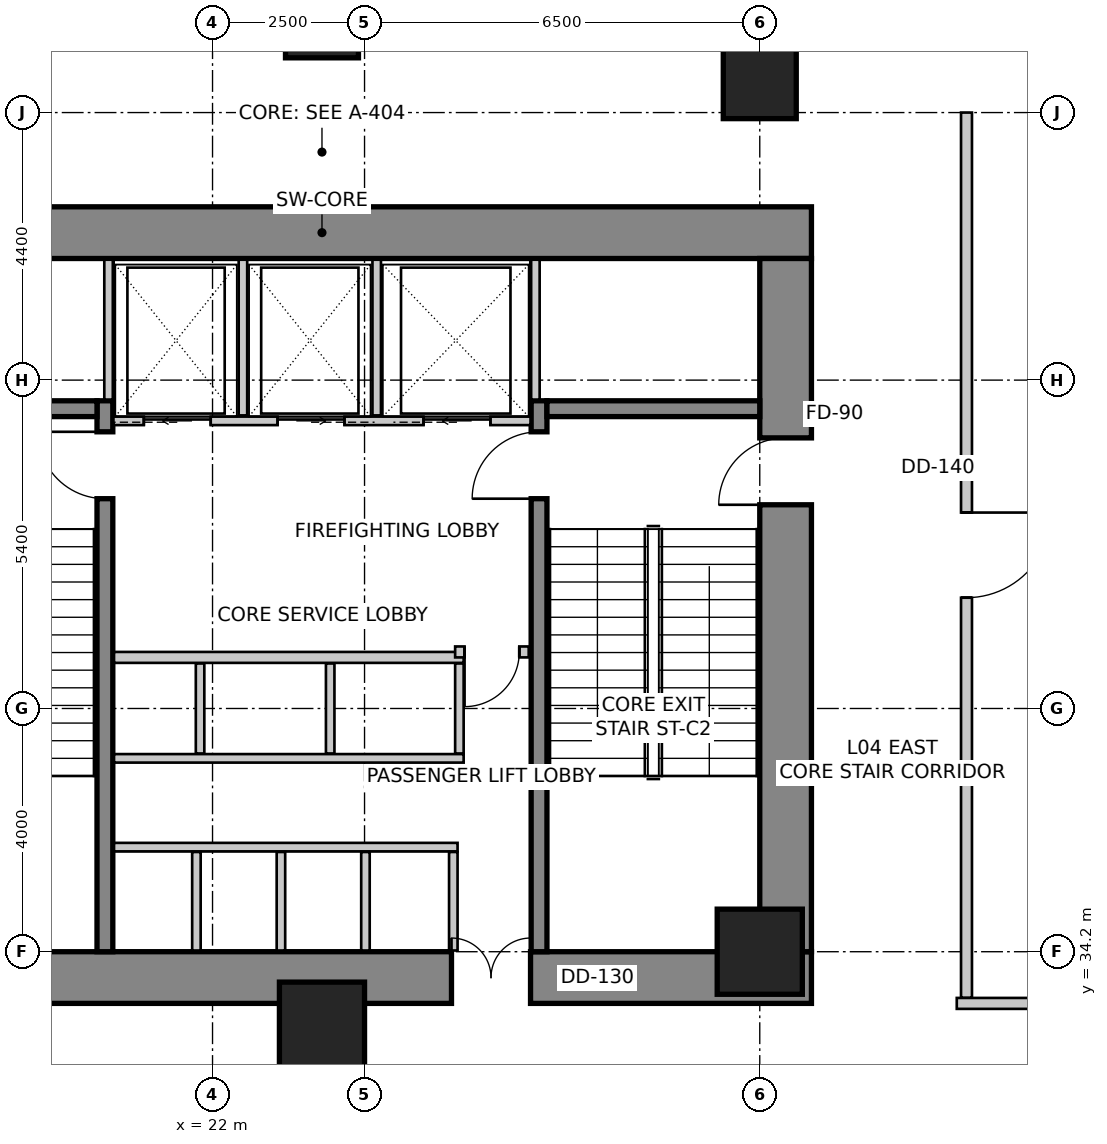
"""IFC4 building model, lengths in metres.
Left out: names, types, materials, properties, quantities, classifications, styles, units other than length and angle.
Written with IfcOpenShell. Run it as: python <this file> out.ifc"""

import sys

from ifc_helpers import new_model, si_unit, direction, frame, frame_2d, origin, origin_2d, place, context, subcontext, project, spatial, rectangle, extrude, source, transform, mapped, element, fill, save


model = new_model("IFC4")
c1 = context("Model", 3, precision=1e-05, world=origin(), true_north=direction((0.0, 1.0)))
c2 = subcontext(c1, "Body", "Model", "MODEL_VIEW")
j1 = project(units=[si_unit("LENGTHUNIT", "METRE"), si_unit("PLANEANGLEUNIT", "RADIAN")], contexts=[c1])
p1 = place(None, origin())
s1 = spatial("IfcSite", under=j1, at=p1, CompositionType="ELEMENT")
p2 = place(p1, origin())
s2 = spatial("IfcBuilding", under=s1, at=p2, CompositionType="ELEMENT")
p3 = place(p2, frame((0.0, 0.0, 16.4)))
s3 = spatial("IfcBuildingStorey", under=s2, at=p3, CompositionType="ELEMENT", Elevation=16.4)
p4 = place(p3, frame((15.75, 46.025, 0.0), z_axis=(0.0, 0.0, 1.0), x_axis=(1.0, 0.0, 0.0)))
e1 = element("IfcWall", 1, at=p4, inside=s3, PredefinedType="SHEAR", context=c2, shape_type="SweptSolid", body=[
    extrude(rectangle(XDim=16.1, YDim=0.85, at=frame_2d((8.05, 0.0))), origin(), (0.0, 0.0, 1.0), 5.2),
])
p5 = place(p3, frame((15.75, 33.775, 0.0), z_axis=(0.0, 0.0, 1.0), x_axis=(1.0, 0.0, 0.0)))
e2 = element("IfcWall", 2, at=p5, inside=s3, PredefinedType="SHEAR", context=c2, shape_type="SweptSolid", body=[
    extrude(rectangle(XDim=16.1, YDim=0.85, at=frame_2d((8.05, 0.0))), origin(), (0.0, 0.0, 1.0), 5.2),
])
m1 = source(origin(), c2, "Body", "SweptSolid", [
    extrude(rectangle(XDim=1.3, YDim=2.15, at=frame_2d((0.65, 1.075))), frame((0.0, 0.435, 0.0), z_axis=(0.0, -1.0, 0.0), x_axis=(1.0, 0.0, 0.0)), (0.0, 0.0, 1.0), 0.87),
])
p6 = place(p5, frame((10.18, 0.0, 0.0)))
e3 = element("IfcOpeningElement", 3, at=p6, cuts=e2, PredefinedType="OPENING", context=c2, shape_type="MappedRepresentation", body=[
    mapped(m1, transform((0.0, 0.0, 0.0), scale=1.0)),
])
p7 = place(p3, frame((31.425, 34.2, 0.0), z_axis=(0.0, 0.0, 1.0), x_axis=(0.0, 1.0, 0.0)))
e4 = element("IfcWall", 4, at=p7, inside=s3, PredefinedType="SHEAR", context=c2, shape_type="SweptSolid", body=[
    extrude(rectangle(XDim=11.4, YDim=0.85, at=frame_2d((5.7, 0.0))), origin(), (0.0, 0.0, 1.0), 5.2),
])
m2 = source(origin(), c2, "Body", "SweptSolid", [
    extrude(rectangle(XDim=1.1, YDim=2.15, at=frame_2d((0.55, 1.075))), frame((0.0, 0.435, 0.0), z_axis=(0.0, -1.0, 0.0), x_axis=(1.0, 0.0, 0.0)), (0.0, 0.0, 1.0), 0.87),
])
p8 = place(p7, frame((7.35, 0.0, 0.0)))
e5 = element("IfcOpeningElement", 5, at=p8, cuts=e4, PredefinedType="OPENING", context=c2, shape_type="MappedRepresentation", body=[
    mapped(m2, transform((0.0, 0.0, 0.0), scale=1.0)),
])
p9 = place(p3, frame((20.23, 34.2, 0.0), z_axis=(0.0, 0.0, 1.0), x_axis=(0.0, 1.0, 0.0)))
e6 = element("IfcWall", 6, at=p9, inside=s3, PredefinedType="SHEAR", context=c2, shape_type="SweptSolid", body=[
    extrude(rectangle(XDim=9.06, YDim=0.26, at=frame_2d((4.53, 0.0))), origin(), (0.0, 0.0, 1.0), 5.2),
])
m3 = source(origin(), c2, "Body", "SweptSolid", [
    extrude(rectangle(XDim=1.1, YDim=2.15, at=frame_2d((0.55, 1.075))), frame((0.0, 0.14, 0.0), z_axis=(0.0, -1.0, 0.0), x_axis=(1.0, 0.0, 0.0)), (0.0, 0.0, 1.0), 0.28),
])
p10 = place(p9, frame((7.45, 0.0, 0.0)))
e7 = element("IfcOpeningElement", 7, at=p10, cuts=e6, PredefinedType="OPENING", context=c2, shape_type="MappedRepresentation", body=[
    mapped(m3, transform((0.0, 0.0, 0.0), scale=1.0)),
])
p11 = place(p3, frame((27.37, 34.2, 0.0), z_axis=(0.0, 0.0, 1.0), x_axis=(0.0, 1.0, 0.0)))
e8 = element("IfcWall", 8, at=p11, inside=s3, PredefinedType="SHEAR", context=c2, shape_type="SweptSolid", body=[
    extrude(rectangle(XDim=9.06, YDim=0.26, at=frame_2d((4.53, 0.0))), origin(), (0.0, 0.0, 1.0), 5.2),
])
p12 = place(p11, frame((7.45, 0.0, 0.0)))
e9 = element("IfcOpeningElement", 9, at=p12, cuts=e8, PredefinedType="OPENING", context=c2, shape_type="MappedRepresentation", body=[
    mapped(m3, transform((0.0, 0.0, 0.0), scale=1.0)),
])
for number, where, z_axis, x_axis in (
    (10, (16.6, 43.13, 0.0), (0.0, 0.0, 1.0), (1.0, 0.0, 0.0)),
    (11, (27.5, 43.13, 0.0), (0.0, 0.0, 1.0), (1.0, 0.0, 0.0)),
):
    element("IfcWall", number, at=place(p3, frame(where, z_axis=z_axis, x_axis=x_axis)), inside=s3, PredefinedType="SHEAR", context=c2, shape_type="SweptSolid", body=[
        extrude(rectangle(XDim=3.5, YDim=0.26, at=frame_2d((1.75, 0.0))), origin(), (0.0, 0.0, 1.0), 5.2),
    ])
m4 = source(origin(), c2, "Body", "SweptSolid", [
    extrude(rectangle(XDim=1.4, YDim=1.4, at=origin_2d()), origin(), (0.0, 0.0, 1.0), 5.2),
])
for number, where, z_axis, x_axis in (
    (12, (23.8, 33.0, 0.0), (0.0, 0.0, 1.0), (1.0, 0.0, 0.0)),
    (13, (31.0, 34.2, 0.0), (0.0, 0.0, 1.0), (1.0, 0.0, 0.0)),
):
    element("IfcColumn", number, at=place(p3, frame(where, z_axis=z_axis, x_axis=x_axis)), inside=s3, PredefinedType="COLUMN", context=c2, shape_type="MappedRepresentation", body=[
        mapped(m4, transform((0.0, 0.0, 0.0), scale=1.0)),
    ])
m5 = source(origin(), c2, "Body", "SweptSolid", [
    extrude(rectangle(XDim=1.2, YDim=1.2, at=origin_2d()), origin(), (0.0, 0.0, 1.0), 5.2),
])
for number, where, z_axis, x_axis in (
    (14, (23.8, 49.5, 0.0), (0.0, 0.0, 1.0), (1.0, 0.0, 0.0)),
    (15, (31.0, 48.5, 0.0), (0.0, 0.0, 1.0), (1.0, 0.0, 0.0)),
):
    element("IfcColumn", number, at=place(p3, frame(where, z_axis=z_axis, x_axis=x_axis)), inside=s3, PredefinedType="COLUMN", context=c2, shape_type="MappedRepresentation", body=[
        mapped(m5, transform((0.0, 0.0, 0.0), scale=1.0)),
    ])
p13 = place(p3, frame((20.37, 42.93, 0.0), z_axis=(0.0, 0.0, 1.0), x_axis=(1.0, 0.0, 0.0)))
e16 = element("IfcWall", 16, at=p13, inside=s3, PredefinedType="SOLIDWALL", context=c2, shape_type="SweptSolid", body=[
    extrude(rectangle(XDim=6.86, YDim=0.14, at=frame_2d((3.43, 0.0))), origin(), (0.0, 0.0, 1.0), 4.85),
])
m6 = source(origin(), c2, "Body", "SweptSolid", [
    extrude(rectangle(XDim=1.1, YDim=2.15, at=frame_2d((0.55, 1.075))), frame((0.0, 0.08, 0.0), z_axis=(0.0, -1.0, 0.0), x_axis=(1.0, 0.0, 0.0)), (0.0, 0.0, 1.0), 0.16),
])
p14 = place(p13, frame((0.5, 0.0, 0.0)))
e17 = element("IfcOpeningElement", 17, at=p14, cuts=e16, PredefinedType="OPENING", context=c2, shape_type="MappedRepresentation", body=[
    mapped(m6, transform((0.0, 0.0, 0.0), scale=1.0)),
])
p15 = place(p13, frame((2.7, 0.0, 0.0)))
e18 = element("IfcOpeningElement", 18, at=p15, cuts=e16, PredefinedType="OPENING", context=c2, shape_type="MappedRepresentation", body=[
    mapped(m6, transform((0.0, 0.0, 0.0), scale=1.0)),
])
p16 = place(p13, frame((5.1, 0.0, 0.0)))
e19 = element("IfcOpeningElement", 19, at=p16, cuts=e16, PredefinedType="OPENING", context=c2, shape_type="MappedRepresentation", body=[
    mapped(m6, transform((0.0, 0.0, 0.0), scale=1.0)),
])
for number, where, z_axis, x_axis in (
    (20, (20.29, 43.28, 0.0), (0.0, 0.0, 1.0), (0.0, 1.0, 0.0)),
    (21, (27.31, 43.28, 0.0), (0.0, 0.0, 1.0), (0.0, 1.0, 0.0)),
):
    element("IfcWall", number, at=place(p3, frame(where, z_axis=z_axis, x_axis=x_axis)), inside=s3, PredefinedType="SOLIDWALL", context=c2, shape_type="SweptSolid", body=[
        extrude(rectangle(XDim=2.3, YDim=0.14, at=frame_2d((1.15, 0.0))), origin(), (0.0, 0.0, 1.0), 4.85),
    ])
for number, where, z_axis, x_axis in (
    (22, (22.5, 43.02, 0.0), (0.0, 0.0, 1.0), (0.0, 1.0, 0.0)),
    (23, (24.7, 43.02, 0.0), (0.0, 0.0, 1.0), (0.0, 1.0, 0.0)),
):
    element("IfcWall", number, at=place(p3, frame(where, z_axis=z_axis, x_axis=x_axis)), inside=s3, PredefinedType="SOLIDWALL", context=c2, shape_type="SweptSolid", body=[
        extrude(rectangle(XDim=2.56, YDim=0.14, at=frame_2d((1.28, 0.0))), origin(), (0.0, 0.0, 1.0), 4.85),
    ])
p17 = place(p3, frame((20.38, 35.92, 0.0), z_axis=(0.0, 0.0, 1.0), x_axis=(1.0, 0.0, 0.0)))
e24 = element("IfcWall", 24, at=p17, inside=s3, PredefinedType="SOLIDWALL", context=c2, shape_type="SweptSolid", body=[
    extrude(rectangle(XDim=5.65, YDim=0.14, at=frame_2d((2.825, 0.0))), origin(), (0.0, 0.0, 1.0), 4.85),
])
for number, where, z_axis, x_axis in (
    (25, (25.96, 34.22, 0.0), (0.0, 0.0, 1.0), (0.0, 1.0, 0.0)),
    (26, (21.735, 34.22, 0.0), (0.0, 0.0, 1.0), (0.0, 1.0, 0.0)),
    (27, (23.125, 34.22, 0.0), (0.0, 0.0, 1.0), (0.0, 1.0, 0.0)),
    (28, (24.515, 34.22, 0.0), (0.0, 0.0, 1.0), (0.0, 1.0, 0.0)),
):
    element("IfcWall", number, at=place(p3, frame(where, z_axis=z_axis, x_axis=x_axis)), inside=s3, PredefinedType="SOLIDWALL", context=c2, shape_type="SweptSolid", body=[
        extrude(rectangle(XDim=1.62, YDim=0.14, at=frame_2d((0.81, 0.0))), origin(), (0.0, 0.0, 1.0), 4.85),
    ])
p18 = place(p3, frame((20.38, 37.38, 0.0), z_axis=(0.0, 0.0, 1.0), x_axis=(1.0, 0.0, 0.0)))
e29 = element("IfcWall", 29, at=p18, inside=s3, PredefinedType="SOLIDWALL", context=c2, shape_type="SweptSolid", body=[
    extrude(rectangle(XDim=5.75, YDim=0.14, at=frame_2d((2.875, 0.0))), origin(), (0.0, 0.0, 1.0), 4.85),
])
p19 = place(p3, frame((20.38, 39.04, 0.0), z_axis=(0.0, 0.0, 1.0), x_axis=(1.0, 0.0, 0.0)))
e30 = element("IfcWall", 30, at=p19, inside=s3, PredefinedType="SOLIDWALL", context=c2, shape_type="SweptSolid", body=[
    extrude(rectangle(XDim=5.75, YDim=0.18, at=frame_2d((2.875, 0.0))), origin(), (0.0, 0.0, 1.0), 4.85),
])
for number, where, z_axis, x_axis in (
    (31, (26.06, 37.46, 0.0), (0.0, 0.0, 1.0), (0.0, 1.0, 0.0)),
    (32, (21.795, 37.46, 0.0), (0.0, 0.0, 1.0), (0.0, 1.0, 0.0)),
    (33, (23.935, 37.46, 0.0), (0.0, 0.0, 1.0), (0.0, 1.0, 0.0)),
):
    element("IfcWall", number, at=place(p3, frame(where, z_axis=z_axis, x_axis=x_axis)), inside=s3, PredefinedType="SOLIDWALL", context=c2, shape_type="SweptSolid", body=[
        extrude(rectangle(XDim=1.48, YDim=0.14, at=frame_2d((0.74, 0.0))), origin(), (0.0, 0.0, 1.0), 4.85),
    ])
p20 = place(p3, frame((27.2, 39.13, 0.0), z_axis=(0.0, 0.0, 1.0), x_axis=(-1.0, 0.0, 0.0)))
e34 = element("IfcWall", 34, at=p20, inside=s3, PredefinedType="PARTITIONING", context=c2, shape_type="SweptSolid", body=[
    extrude(rectangle(XDim=1.21, YDim=0.18, at=frame_2d((0.605, 0.0))), origin(), (0.0, 0.0, 1.0), 4.85),
])
m7 = source(origin(), c2, "Body", "SweptSolid", [
    extrude(rectangle(XDim=0.9, YDim=2.15, at=frame_2d((0.45, 1.075))), frame((0.0, 0.1, 0.0), z_axis=(0.0, -1.0, 0.0), x_axis=(1.0, 0.0, 0.0)), (0.0, 0.0, 1.0), 0.2),
])
p21 = place(p20, frame((0.155, 0.0, 0.0)))
e35 = element("IfcOpeningElement", 35, at=p21, cuts=e34, PredefinedType="OPENING", context=c2, shape_type="MappedRepresentation", body=[
    mapped(m7, transform((0.0, 0.0, 0.0), scale=1.0)),
])
p22 = place(p3, frame((34.24, 33.35, 0.0), z_axis=(0.0, 0.0, 1.0), x_axis=(1.0, 0.0, 0.0)))
e36 = element("IfcWall", 36, at=p22, inside=s3, PredefinedType="PARTITIONING", context=c2, shape_type="SweptSolid", body=[
    extrude(rectangle(XDim=33.495, YDim=0.18, at=frame_2d((16.748, 0.0))), origin(), (0.0, 0.0, 1.0), 3.042),
])
p23 = place(p3, frame((34.4, 48.0, 0.0), z_axis=(0.0, 0.0, 1.0), x_axis=(0.0, -1.0, 0.0)))
e37 = element("IfcWall", 37, at=p23, inside=s3, PredefinedType="PARTITIONING", context=c2, shape_type="SweptSolid", body=[
    extrude(rectangle(XDim=14.556, YDim=0.18, at=frame_2d((7.278, 0.0))), origin(), (0.0, 0.0, 1.0), 3.892),
])
m8 = source(origin(), c2, "Body", "SweptSolid", [
    extrude(rectangle(XDim=1.4, YDim=2.15, at=frame_2d((0.7, 1.075))), frame((0.0, 0.1, 0.0), z_axis=(0.0, -1.0, 0.0), x_axis=(1.0, 0.0, 0.0)), (0.0, 0.0, 1.0), 0.2),
])
p24 = place(p23, frame((6.578, 0.0, 0.0)))
e38 = element("IfcOpeningElement", 38, at=p24, cuts=e37, PredefinedType="OPENING", context=c2, shape_type="MappedRepresentation", body=[
    mapped(m8, transform((0.0, 0.0, 0.0), scale=1.0)),
])
m9 = source(origin(), c2, "Body", "SweptSolid", [
    extrude(rectangle(XDim=1.1, YDim=2.15, at=frame_2d((0.55, 1.075))), frame((0.0, 0.025, 0.0), z_axis=(0.0, -1.0, 0.0), x_axis=(1.0, 0.0, 0.0)), (0.0, 0.0, 1.0), 0.05),
])
p25 = place(p14, origin())
e39 = element("IfcDoor", 39, at=p25, inside=s3, OperationType="SLIDING_TO_LEFT", PredefinedType="DOOR", context=c2, shape_type="MappedRepresentation", body=[
    mapped(m9, transform((0.0, 0.0, 0.0), scale=1.0)),
])
fill(e17, e39)
p26 = place(p15, origin())
e40 = element("IfcDoor", 40, at=p26, inside=s3, OperationType="SLIDING_TO_RIGHT", PredefinedType="DOOR", context=c2, shape_type="MappedRepresentation", body=[
    mapped(m9, transform((0.0, 0.0, 0.0), scale=1.0)),
])
fill(e18, e40)
m10 = source(origin(), c2, "Body", "SweptSolid", [
    extrude(rectangle(XDim=1.1, YDim=2.15, at=frame_2d((0.55, 1.075))), frame((0.0, 0.025, 0.0), z_axis=(0.0, -1.0, 0.0), x_axis=(1.0, 0.0, 0.0)), (0.0, 0.0, 1.0), 0.05),
])
p27 = place(p16, origin())
e41 = element("IfcDoor", 41, at=p27, inside=s3, OperationType="SLIDING_TO_LEFT", PredefinedType="DOOR", context=c2, shape_type="MappedRepresentation", body=[
    mapped(m10, transform((0.0, 0.0, 0.0), scale=1.0)),
])
fill(e19, e41)
m11 = source(origin(), c2, "Body", "SweptSolid", [
    extrude(rectangle(XDim=1.1, YDim=2.15, at=frame_2d((0.55, 1.075))), frame((0.0, 0.025, 0.0), z_axis=(0.0, -1.0, 0.0), x_axis=(1.0, 0.0, 0.0)), (0.0, 0.0, 1.0), 0.05),
])
p28 = place(p10, origin())
e42 = element("IfcDoor", 42, at=p28, inside=s3, OperationType="SINGLE_SWING_RIGHT", PredefinedType="DOOR", context=c2, shape_type="MappedRepresentation", body=[
    mapped(m11, transform((0.0, 0.0, 0.0), scale=1.0)),
])
fill(e7, e42)
p29 = place(p12, origin())
e43 = element("IfcDoor", 43, at=p29, inside=s3, OperationType="SINGLE_SWING_LEFT", PredefinedType="DOOR", context=c2, shape_type="MappedRepresentation", body=[
    mapped(m11, transform((0.0, 0.0, 0.0), scale=1.0)),
])
fill(e9, e43)
p30 = place(p8, origin())
e44 = element("IfcDoor", 44, at=p30, inside=s3, OperationType="SINGLE_SWING_LEFT", PredefinedType="DOOR", context=c2, shape_type="MappedRepresentation", body=[
    mapped(m11, transform((0.0, 0.0, 0.0), scale=1.0)),
])
fill(e5, e44)
m12 = source(origin(), c2, "Body", "SweptSolid", [
    extrude(rectangle(XDim=1.3, YDim=2.15, at=frame_2d((0.65, 1.075))), frame((0.0, 0.025, 0.0), z_axis=(0.0, -1.0, 0.0), x_axis=(1.0, 0.0, 0.0)), (0.0, 0.0, 1.0), 0.05),
])
p31 = place(p6, origin())
e45 = element("IfcDoor", 45, at=p31, inside=s3, OperationType="DOUBLE_DOOR_SINGLE_SWING", PredefinedType="DOOR", context=c2, shape_type="MappedRepresentation", body=[
    mapped(m12, transform((0.0, 0.0, 0.0), scale=1.0)),
])
fill(e3, e45)
m13 = source(origin(), c2, "Body", "SweptSolid", [
    extrude(rectangle(XDim=0.9, YDim=2.15, at=frame_2d((0.45, 1.075))), frame((0.0, 0.025, 0.0), z_axis=(0.0, -1.0, 0.0), x_axis=(1.0, 0.0, 0.0)), (0.0, 0.0, 1.0), 0.05),
])
p32 = place(p21, origin())
e46 = element("IfcDoor", 46, at=p32, inside=s3, OperationType="SINGLE_SWING_RIGHT", PredefinedType="DOOR", context=c2, shape_type="MappedRepresentation", body=[
    mapped(m13, transform((0.0, 0.0, 0.0), scale=1.0)),
])
fill(e35, e46)
m14 = source(origin(), c2, "Body", "SweptSolid", [
    extrude(rectangle(XDim=1.4, YDim=2.15, at=frame_2d((0.7, 1.075))), frame((0.0, 0.025, 0.0), z_axis=(0.0, -1.0, 0.0), x_axis=(1.0, 0.0, 0.0)), (0.0, 0.0, 1.0), 0.05),
])
p33 = place(p24, origin())
e47 = element("IfcDoor", 47, at=p33, inside=s3, OperationType="SINGLE_SWING_LEFT", PredefinedType="DOOR", context=c2, shape_type="MappedRepresentation", body=[
    mapped(m14, transform((0.0, 0.0, 0.0), scale=1.0)),
])
fill(e38, e47)
save(model, sys.argv[1])
